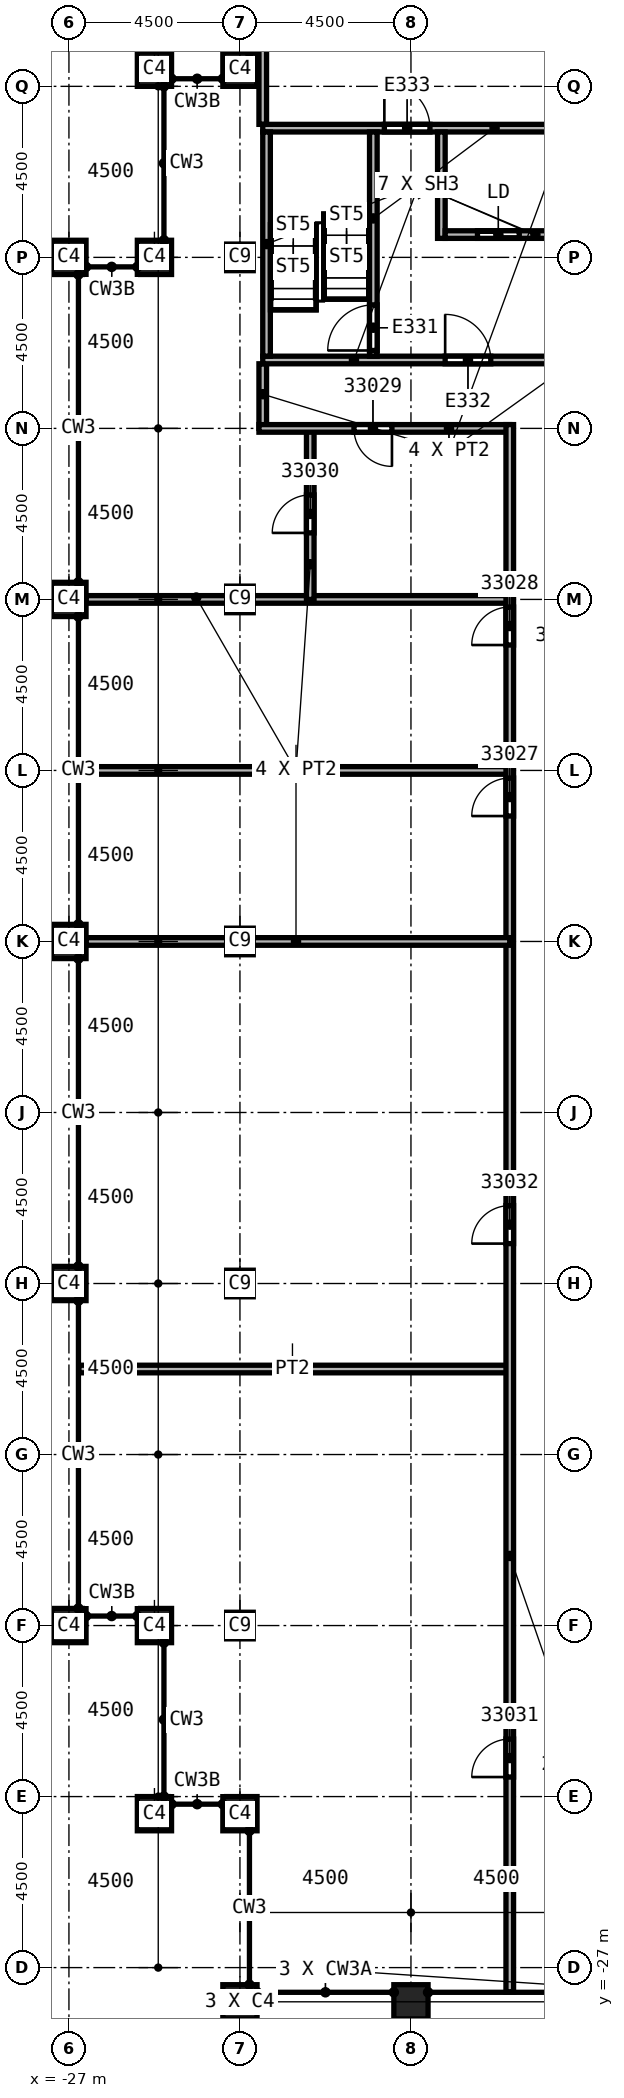
"""IFC4 building model, lengths in metres.
Left out: names, types, materials, properties, quantities, classifications, styles, units other than length and angle.
Written with IfcOpenShell. Run it as: python <this file> out.ifc"""

import sys

from ifc_helpers import new_model, si_unit, direction, frame, frame_2d, origin, origin_2d, place, context, subcontext, project, spatial, rectangle, extrude, element, fill, save


model = new_model("IFC4")
c1 = context("Model", 3, precision=1e-05, world=origin(), true_north=direction((0.0, 1.0)))
c2 = subcontext(c1, "Body", "Model", "MODEL_VIEW")
j1 = project(units=[si_unit("LENGTHUNIT", "METRE"), si_unit("PLANEANGLEUNIT", "RADIAN")], contexts=[c1])
p1 = place(None, origin())
s1 = spatial("IfcSite", under=j1, at=p1, CompositionType="ELEMENT")
p2 = place(p1, origin())
s2 = spatial("IfcBuilding", under=s1, at=p2, CompositionType="ELEMENT")
p3 = place(p2, frame((0.0, 0.0, 361.0)))
s3 = spatial("IfcBuildingStorey", under=s2, at=p3, CompositionType="ELEMENT", Elevation=361.0)
for number, where, z_axis, x_axis in (
    (1, (-22.5, 0.0, 0.0), (0.0, 0.0, 1.0), (1.0, 0.0, 0.0)),
    (2, (-22.5, 9.0, 0.0), (0.0, 0.0, 1.0), (1.0, 0.0, 0.0)),
    (3, (-22.5, 18.0, 0.0), (0.0, 0.0, 1.0), (1.0, 0.0, 0.0)),
    (4, (-22.5, -9.0, 0.0), (0.0, 0.0, 1.0), (1.0, 0.0, 0.0)),
    (5, (-22.5, -18.0, 0.0), (0.0, 0.0, 1.0), (1.0, 0.0, 0.0)),
):
    element("IfcColumn", number, at=place(p3, frame(where, z_axis=z_axis, x_axis=x_axis)), inside=s3, PredefinedType="COLUMN", context=c2, shape_type="SweptSolid", body=[
        extrude(rectangle(XDim=0.7, YDim=0.7, at=origin_2d()), origin(), (0.0, 0.0, 1.0), 4.6),
    ])
for number, where, z_axis, x_axis in (
    (6, (-18.0, -27.9, 0.0), (0.0, 0.0, 1.0), (1.0, 0.0, 0.0)),
    (7, (-22.5, -27.9, 0.0), (0.0, 0.0, 1.0), (1.0, 0.0, 0.0)),
    (8, (-27.0, 0.0, 0.0), (0.0, 0.0, 1.0), (0.0, 1.0, 0.0)),
    (9, (-27.0, 9.0, 0.0), (0.0, 0.0, 1.0), (0.0, 1.0, 0.0)),
    (10, (-27.0, 18.0, 0.0), (0.0, 0.0, 1.0), (0.0, 1.0, 0.0)),
    (11, (-27.0, -9.0, 0.0), (0.0, 0.0, 1.0), (0.0, 1.0, 0.0)),
    (12, (-27.0, -18.0, 0.0), (0.0, 0.0, 1.0), (0.0, 1.0, 0.0)),
    (13, (-22.5, 22.95, 0.0), (0.0, 0.0, 1.0), (1.0, 0.0, 0.0)),
    (14, (-24.75, 22.95, 0.0), (0.0, 0.0, 1.0), (1.0, 0.0, 0.0)),
    (15, (-24.75, 18.0, 0.0), (0.0, 0.0, 1.0), (1.0, 0.0, 0.0)),
    (16, (-22.5, -22.95, 0.0), (0.0, 0.0, 1.0), (1.0, 0.0, 0.0)),
    (17, (-24.75, -22.95, 0.0), (0.0, 0.0, 1.0), (1.0, 0.0, 0.0)),
    (18, (-24.75, -18.0, 0.0), (0.0, 0.0, 1.0), (1.0, 0.0, 0.0)),
):
    element("IfcColumn", number, at=place(p3, frame(where, z_axis=z_axis, x_axis=x_axis)), inside=s3, PredefinedType="COLUMN", context=c2, shape_type="SweptSolid", body=[
        extrude(rectangle(XDim=0.9, YDim=0.9, at=origin_2d()), origin(), (0.0, 0.0, 1.0), 4.6),
    ])
p4 = place(p3, frame((-26.736, -11.25, 0.0), z_axis=(0.0, 0.0, 1.0), x_axis=(1.0, 0.0, 0.0)))
e19 = element("IfcWall", 19, at=p4, inside=s3, PredefinedType="PARTITIONING", context=c2, shape_type="SweptSolid", body=[
    extrude(rectangle(XDim=11.336, YDim=0.2, at=frame_2d((5.668, 0.0))), origin(), (0.0, 0.0, 1.0), 4.15),
])
for number, where, z_axis, x_axis in (
    (20, (-26.55, 4.5, 0.0), (0.0, 0.0, 1.0), (1.0, 0.0, 0.0)),
    (21, (-26.55, 9.0, 0.0), (0.0, 0.0, 1.0), (1.0, 0.0, 0.0)),
):
    element("IfcWall", number, at=place(p3, frame(where, z_axis=z_axis, x_axis=x_axis)), inside=s3, PredefinedType="PARTITIONING", context=c2, shape_type="SweptSolid", body=[
        extrude(rectangle(XDim=11.15, YDim=0.2, at=frame_2d((5.575, 0.0))), origin(), (0.0, 0.0, 1.0), 4.15),
    ])
p5 = place(p3, frame((-21.9, 13.5, 0.0), z_axis=(0.0, 0.0, 1.0), x_axis=(0.0, 1.0, 0.0)))
e22 = element("IfcWall", 22, at=p5, inside=s3, PredefinedType="PARTITIONING", context=c2, shape_type="SweptSolid", body=[
    extrude(rectangle(XDim=1.7, YDim=0.2, at=frame_2d((0.85, 0.0))), origin(), (0.0, 0.0, 1.0), 4.15),
])
p6 = place(p3, frame((-21.9, 21.5, 0.0), z_axis=(0.0, 0.0, 1.0), x_axis=(0.0, 1.0, 0.0)))
e23 = element("IfcWall", 23, at=p6, inside=s3, PredefinedType="PARTITIONING", context=c2, shape_type="SweptSolid", body=[
    extrude(rectangle(XDim=6.136, YDim=0.2, at=frame_2d((3.068, 0.0))), origin(), (0.0, 0.0, 1.0), 4.15),
])
p7 = place(p3, frame((-20.65, 9.0, 0.0), z_axis=(0.0, 0.0, 1.0), x_axis=(0.0, 1.0, 0.0)))
e24 = element("IfcWall", 24, at=p7, inside=s3, PredefinedType="PARTITIONING", context=c2, shape_type="SweptSolid", body=[
    extrude(rectangle(XDim=4.5, YDim=0.2, at=frame_2d((2.25, 0.0))), origin(), (0.0, 0.0, 1.0), 4.15),
])
p8 = place(p7, frame((1.75, 0.0, 0.0)))
e25 = element("IfcOpeningElement", 25, at=p8, cuts=e24, PredefinedType="OPENING", context=c2, shape_type="SweptSolid", body=[
    extrude(rectangle(XDim=1.0, YDim=2.1, at=frame_2d((0.5, 1.05))), frame((0.0, 0.1, 0.0), z_axis=(0.0, -1.0, 0.0), x_axis=(1.0, 0.0, 0.0)), (0.0, 0.0, 1.0), 0.2),
])
p9 = place(p3, frame((-15.4, 13.5, 0.0), z_axis=(0.0, 0.0, 1.0), x_axis=(-1.0, 0.0, 0.0)))
e26 = element("IfcWall", 26, at=p9, inside=s3, PredefinedType="PARTITIONING", context=c2, shape_type="SweptSolid", body=[
    extrude(rectangle(XDim=6.6, YDim=0.2, at=frame_2d((3.3, 0.0))), origin(), (0.0, 0.0, 1.0), 4.15),
])
p10 = place(p9, frame((3.1, 0.0, 0.0)))
e27 = element("IfcOpeningElement", 27, at=p10, cuts=e26, PredefinedType="OPENING", context=c2, shape_type="SweptSolid", body=[
    extrude(rectangle(XDim=1.0, YDim=2.1, at=frame_2d((0.5, 1.05))), frame((0.0, 0.1, 0.0), z_axis=(0.0, -1.0, 0.0), x_axis=(1.0, 0.0, 0.0)), (0.0, 0.0, 1.0), 0.2),
])
p11 = place(p3, frame((-15.4, -27.636, 0.0), z_axis=(0.0, 0.0, 1.0), x_axis=(0.0, 1.0, 0.0)))
e28 = element("IfcWall", 28, at=p11, inside=s3, PredefinedType="PARTITIONING", context=c2, shape_type="SweptSolid", body=[
    extrude(rectangle(XDim=41.236, YDim=0.2, at=frame_2d((20.618, 0.0))), origin(), (0.0, 0.0, 1.0), 4.15),
])
p12 = place(p11, frame((30.936, 0.0, 0.0)))
e29 = element("IfcOpeningElement", 29, at=p12, cuts=e28, PredefinedType="OPENING", context=c2, shape_type="SweptSolid", body=[
    extrude(rectangle(XDim=1.0, YDim=2.1, at=frame_2d((0.5, 1.05))), frame((0.0, 0.1, 0.0), z_axis=(0.0, -1.0, 0.0), x_axis=(1.0, 0.0, 0.0)), (0.0, 0.0, 1.0), 0.2),
])
p13 = place(p11, frame((35.436, 0.0, 0.0)))
e30 = element("IfcOpeningElement", 30, at=p13, cuts=e28, PredefinedType="OPENING", context=c2, shape_type="SweptSolid", body=[
    extrude(rectangle(XDim=1.0, YDim=2.1, at=frame_2d((0.5, 1.05))), frame((0.0, 0.1, 0.0), z_axis=(0.0, -1.0, 0.0), x_axis=(1.0, 0.0, 0.0)), (0.0, 0.0, 1.0), 0.2),
])
p14 = place(p11, frame((5.65, 0.0, 0.0)))
e31 = element("IfcOpeningElement", 31, at=p14, cuts=e28, PredefinedType="OPENING", context=c2, shape_type="SweptSolid", body=[
    extrude(rectangle(XDim=1.0, YDim=2.1, at=frame_2d((0.5, 1.05))), frame((0.0, 0.1, 0.0), z_axis=(0.0, -1.0, 0.0), x_axis=(1.0, 0.0, 0.0)), (0.0, 0.0, 1.0), 0.2),
])
p15 = place(p11, frame((19.686, 0.0, 0.0)))
e32 = element("IfcOpeningElement", 32, at=p15, cuts=e28, PredefinedType="OPENING", context=c2, shape_type="SweptSolid", body=[
    extrude(rectangle(XDim=1.0, YDim=2.1, at=frame_2d((0.5, 1.05))), frame((0.0, 0.1, 0.0), z_axis=(0.0, -1.0, 0.0), x_axis=(1.0, 0.0, 0.0)), (0.0, 0.0, 1.0), 0.2),
])
p16 = place(p3, frame((-15.4, 0.0, 0.0), z_axis=(0.0, 0.0, 1.0), x_axis=(-1.0, 0.0, 0.0)))
e33 = element("IfcWall", 33, at=p16, inside=s3, PredefinedType="PARTITIONING", context=c2, shape_type="SweptSolid", body=[
    extrude(rectangle(XDim=11.15, YDim=0.2, at=frame_2d((5.575, 0.0))), origin(), (0.0, 0.0, 1.0), 4.15),
])
p17 = place(p3, frame((-21.9, 15.3, 0.0), z_axis=(0.0, 0.0, 1.0), x_axis=(1.0, 0.0, 0.0)))
e34 = element("IfcWall", 34, at=p17, inside=s3, PredefinedType="SOLIDWALL", context=c2, shape_type="SweptSolid", body=[
    extrude(rectangle(XDim=8.275, YDim=0.2, at=frame_2d((4.137, 0.0))), origin(), (0.0, 0.0, 1.0), 4.15),
])
p18 = place(p17, frame((4.8, 0.0, 0.0)))
e35 = element("IfcOpeningElement", 35, at=p18, cuts=e34, PredefinedType="OPENING", context=c2, shape_type="SweptSolid", body=[
    extrude(rectangle(XDim=1.2, YDim=2.1, at=frame_2d((0.6, 1.05))), frame((0.0, 0.1, 0.0), z_axis=(0.0, -1.0, 0.0), x_axis=(1.0, 0.0, 0.0)), (0.0, 0.0, 1.0), 0.2),
])
p19 = place(p3, frame((-21.9, 21.4, 0.0), z_axis=(0.0, 0.0, 1.0), x_axis=(1.0, 0.0, 0.0)))
e36 = element("IfcWall", 36, at=p19, inside=s3, PredefinedType="SOLIDWALL", context=c2, shape_type="SweptSolid", body=[
    extrude(rectangle(XDim=7.8, YDim=0.2, at=frame_2d((3.9, 0.0))), origin(), (0.0, 0.0, 1.0), 4.15),
])
p20 = place(p19, frame((3.2, 0.0, 0.0)))
e37 = element("IfcOpeningElement", 37, at=p20, cuts=e36, PredefinedType="OPENING", context=c2, shape_type="SweptSolid", body=[
    extrude(rectangle(XDim=1.2, YDim=2.1, at=frame_2d((0.6, 1.05))), frame((0.0, 0.1, 0.0), z_axis=(0.0, -1.0, 0.0), x_axis=(1.0, 0.0, 0.0)), (0.0, 0.0, 1.0), 0.2),
])
p21 = place(p3, frame((-21.8, 15.4, 0.0), z_axis=(0.0, 0.0, 1.0), x_axis=(0.0, 1.0, 0.0)))
e38 = element("IfcWall", 38, at=p21, inside=s3, PredefinedType="SOLIDWALL", context=c2, shape_type="SweptSolid", body=[
    extrude(rectangle(XDim=5.9, YDim=0.2, at=frame_2d((2.95, 0.0))), origin(), (0.0, 0.0, 1.0), 4.15),
])
p22 = place(p3, frame((-18.99, 15.4, 0.0), z_axis=(0.0, 0.0, 1.0), x_axis=(0.0, 1.0, 0.0)))
e39 = element("IfcWall", 39, at=p22, inside=s3, PredefinedType="SOLIDWALL", context=c2, shape_type="SweptSolid", body=[
    extrude(rectangle(XDim=5.9, YDim=0.2, at=frame_2d((2.95, 0.0))), origin(), (0.0, 0.0, 1.0), 4.15),
])
p23 = place(p22, frame((0.15, 0.0, 0.0)))
e40 = element("IfcOpeningElement", 40, at=p23, cuts=e39, PredefinedType="OPENING", context=c2, shape_type="SweptSolid", body=[
    extrude(rectangle(XDim=1.2, YDim=2.1, at=frame_2d((0.6, 1.05))), frame((0.0, 0.1, 0.0), z_axis=(0.0, -1.0, 0.0), x_axis=(1.0, 0.0, 0.0)), (0.0, 0.0, 1.0), 0.2),
])
p24 = place(p3, frame((-17.2, 18.5, 0.0), z_axis=(0.0, 0.0, 1.0), x_axis=(0.0, 1.0, 0.0)))
e41 = element("IfcWall", 41, at=p24, inside=s3, PredefinedType="SOLIDWALL", context=c2, shape_type="SweptSolid", body=[
    extrude(rectangle(XDim=2.8, YDim=0.2, at=frame_2d((1.4, 0.0))), origin(), (0.0, 0.0, 1.0), 4.15),
])
p25 = place(p3, frame((-17.1, 18.6, 0.0), z_axis=(0.0, 0.0, 1.0), x_axis=(1.0, 0.0, 0.0)))
e42 = element("IfcWall", 42, at=p25, inside=s3, PredefinedType="SOLIDWALL", context=c2, shape_type="SweptSolid", body=[
    extrude(rectangle(XDim=2.8, YDim=0.2, at=frame_2d((1.4, 0.0))), origin(), (0.0, 0.0, 1.0), 4.15),
])
p26 = place(p25, frame((0.85, 0.0, 0.0)))
e43 = element("IfcOpeningElement", 43, at=p26, cuts=e42, PredefinedType="OPENING", context=c2, shape_type="SweptSolid", body=[
    extrude(rectangle(XDim=1.1, YDim=2.1, at=frame_2d((0.55, 1.05))), frame((0.0, 0.1, 0.0), z_axis=(0.0, -1.0, 0.0), x_axis=(1.0, 0.0, 0.0)), (0.0, 0.0, 1.0), 0.2),
])
p27 = place(p12, origin())
e44 = element("IfcDoor", 44, at=p27, inside=s3, OperationType="SINGLE_SWING_RIGHT", PredefinedType="DOOR", context=c2, shape_type="SweptSolid", body=[
    extrude(rectangle(XDim=1.0, YDim=2.1, at=frame_2d((0.5, 1.05))), frame((0.0, 0.025, 0.0), z_axis=(0.0, -1.0, 0.0), x_axis=(1.0, 0.0, 0.0)), (0.0, 0.0, 1.0), 0.05),
])
fill(e29, e44)
p28 = place(p13, origin())
e45 = element("IfcDoor", 45, at=p28, inside=s3, OperationType="SINGLE_SWING_LEFT", PredefinedType="DOOR", context=c2, shape_type="SweptSolid", body=[
    extrude(rectangle(XDim=1.0, YDim=2.1, at=frame_2d((0.5, 1.05))), frame((0.0, 0.025, 0.0), z_axis=(0.0, -1.0, 0.0), x_axis=(1.0, 0.0, 0.0)), (0.0, 0.0, 1.0), 0.05),
])
fill(e30, e45)
p29 = place(p10, origin())
e46 = element("IfcDoor", 46, at=p29, inside=s3, OperationType="SINGLE_SWING_RIGHT", PredefinedType="DOOR", context=c2, shape_type="SweptSolid", body=[
    extrude(rectangle(XDim=1.0, YDim=2.1, at=frame_2d((0.5, 1.05))), frame((0.0, 0.025, 0.0), z_axis=(0.0, -1.0, 0.0), x_axis=(1.0, 0.0, 0.0)), (0.0, 0.0, 1.0), 0.05),
])
fill(e27, e46)
p30 = place(p8, origin())
e47 = element("IfcDoor", 47, at=p30, inside=s3, OperationType="SINGLE_SWING_LEFT", PredefinedType="DOOR", context=c2, shape_type="SweptSolid", body=[
    extrude(rectangle(XDim=1.0, YDim=2.1, at=frame_2d((0.5, 1.05))), frame((0.0, 0.025, 0.0), z_axis=(0.0, -1.0, 0.0), x_axis=(1.0, 0.0, 0.0)), (0.0, 0.0, 1.0), 0.05),
])
fill(e25, e47)
p31 = place(p14, origin())
e48 = element("IfcDoor", 48, at=p31, inside=s3, OperationType="SINGLE_SWING_RIGHT", PredefinedType="DOOR", context=c2, shape_type="SweptSolid", body=[
    extrude(rectangle(XDim=1.0, YDim=2.1, at=frame_2d((0.5, 1.05))), frame((0.0, 0.025, 0.0), z_axis=(0.0, -1.0, 0.0), x_axis=(1.0, 0.0, 0.0)), (0.0, 0.0, 1.0), 0.05),
])
fill(e31, e48)
p32 = place(p15, origin())
e49 = element("IfcDoor", 49, at=p32, inside=s3, OperationType="SINGLE_SWING_LEFT", PredefinedType="DOOR", context=c2, shape_type="SweptSolid", body=[
    extrude(rectangle(XDim=1.0, YDim=2.1, at=frame_2d((0.5, 1.05))), frame((0.0, 0.025, 0.0), z_axis=(0.0, -1.0, 0.0), x_axis=(1.0, 0.0, 0.0)), (0.0, 0.0, 1.0), 0.05),
])
fill(e32, e49)
p33 = place(p23, origin())
e50 = element("IfcDoor", 50, at=p33, inside=s3, OperationType="SINGLE_SWING_LEFT", PredefinedType="DOOR", context=c2, shape_type="SweptSolid", body=[
    extrude(rectangle(XDim=1.2, YDim=2.1, at=frame_2d((0.6, 1.05))), frame((0.0, 0.025, 0.0), z_axis=(0.0, -1.0, 0.0), x_axis=(1.0, 0.0, 0.0)), (0.0, 0.0, 1.0), 0.05),
])
fill(e40, e50)
p34 = place(p26, origin())
e51 = element("IfcDoor", 51, at=p34, inside=s3, OperationType="SLIDING_TO_LEFT", PredefinedType="DOOR", context=c2, shape_type="SweptSolid", body=[
    extrude(rectangle(XDim=1.1, YDim=2.1, at=frame_2d((0.55, 1.05))), frame((0.0, 0.025, 0.0), z_axis=(0.0, -1.0, 0.0), x_axis=(1.0, 0.0, 0.0)), (0.0, 0.0, 1.0), 0.05),
])
fill(e43, e51)
p35 = place(p18, origin())
e52 = element("IfcDoor", 52, at=p35, inside=s3, OperationType="SINGLE_SWING_RIGHT", PredefinedType="DOOR", context=c2, shape_type="SweptSolid", body=[
    extrude(rectangle(XDim=1.2, YDim=2.1, at=frame_2d((0.6, 1.05))), frame((0.0, 0.025, 0.0), z_axis=(0.0, -1.0, 0.0), x_axis=(1.0, 0.0, 0.0)), (0.0, 0.0, 1.0), 0.05),
])
fill(e35, e52)
p36 = place(p20, origin())
e53 = element("IfcDoor", 53, at=p36, inside=s3, OperationType="SINGLE_SWING_LEFT", PredefinedType="DOOR", context=c2, shape_type="SweptSolid", body=[
    extrude(rectangle(XDim=1.2, YDim=2.1, at=frame_2d((0.6, 1.05))), frame((0.0, 0.025, 0.0), z_axis=(0.0, -1.0, 0.0), x_axis=(1.0, 0.0, 0.0)), (0.0, 0.0, 1.0), 0.05),
])
fill(e37, e53)
save(model, sys.argv[1])
